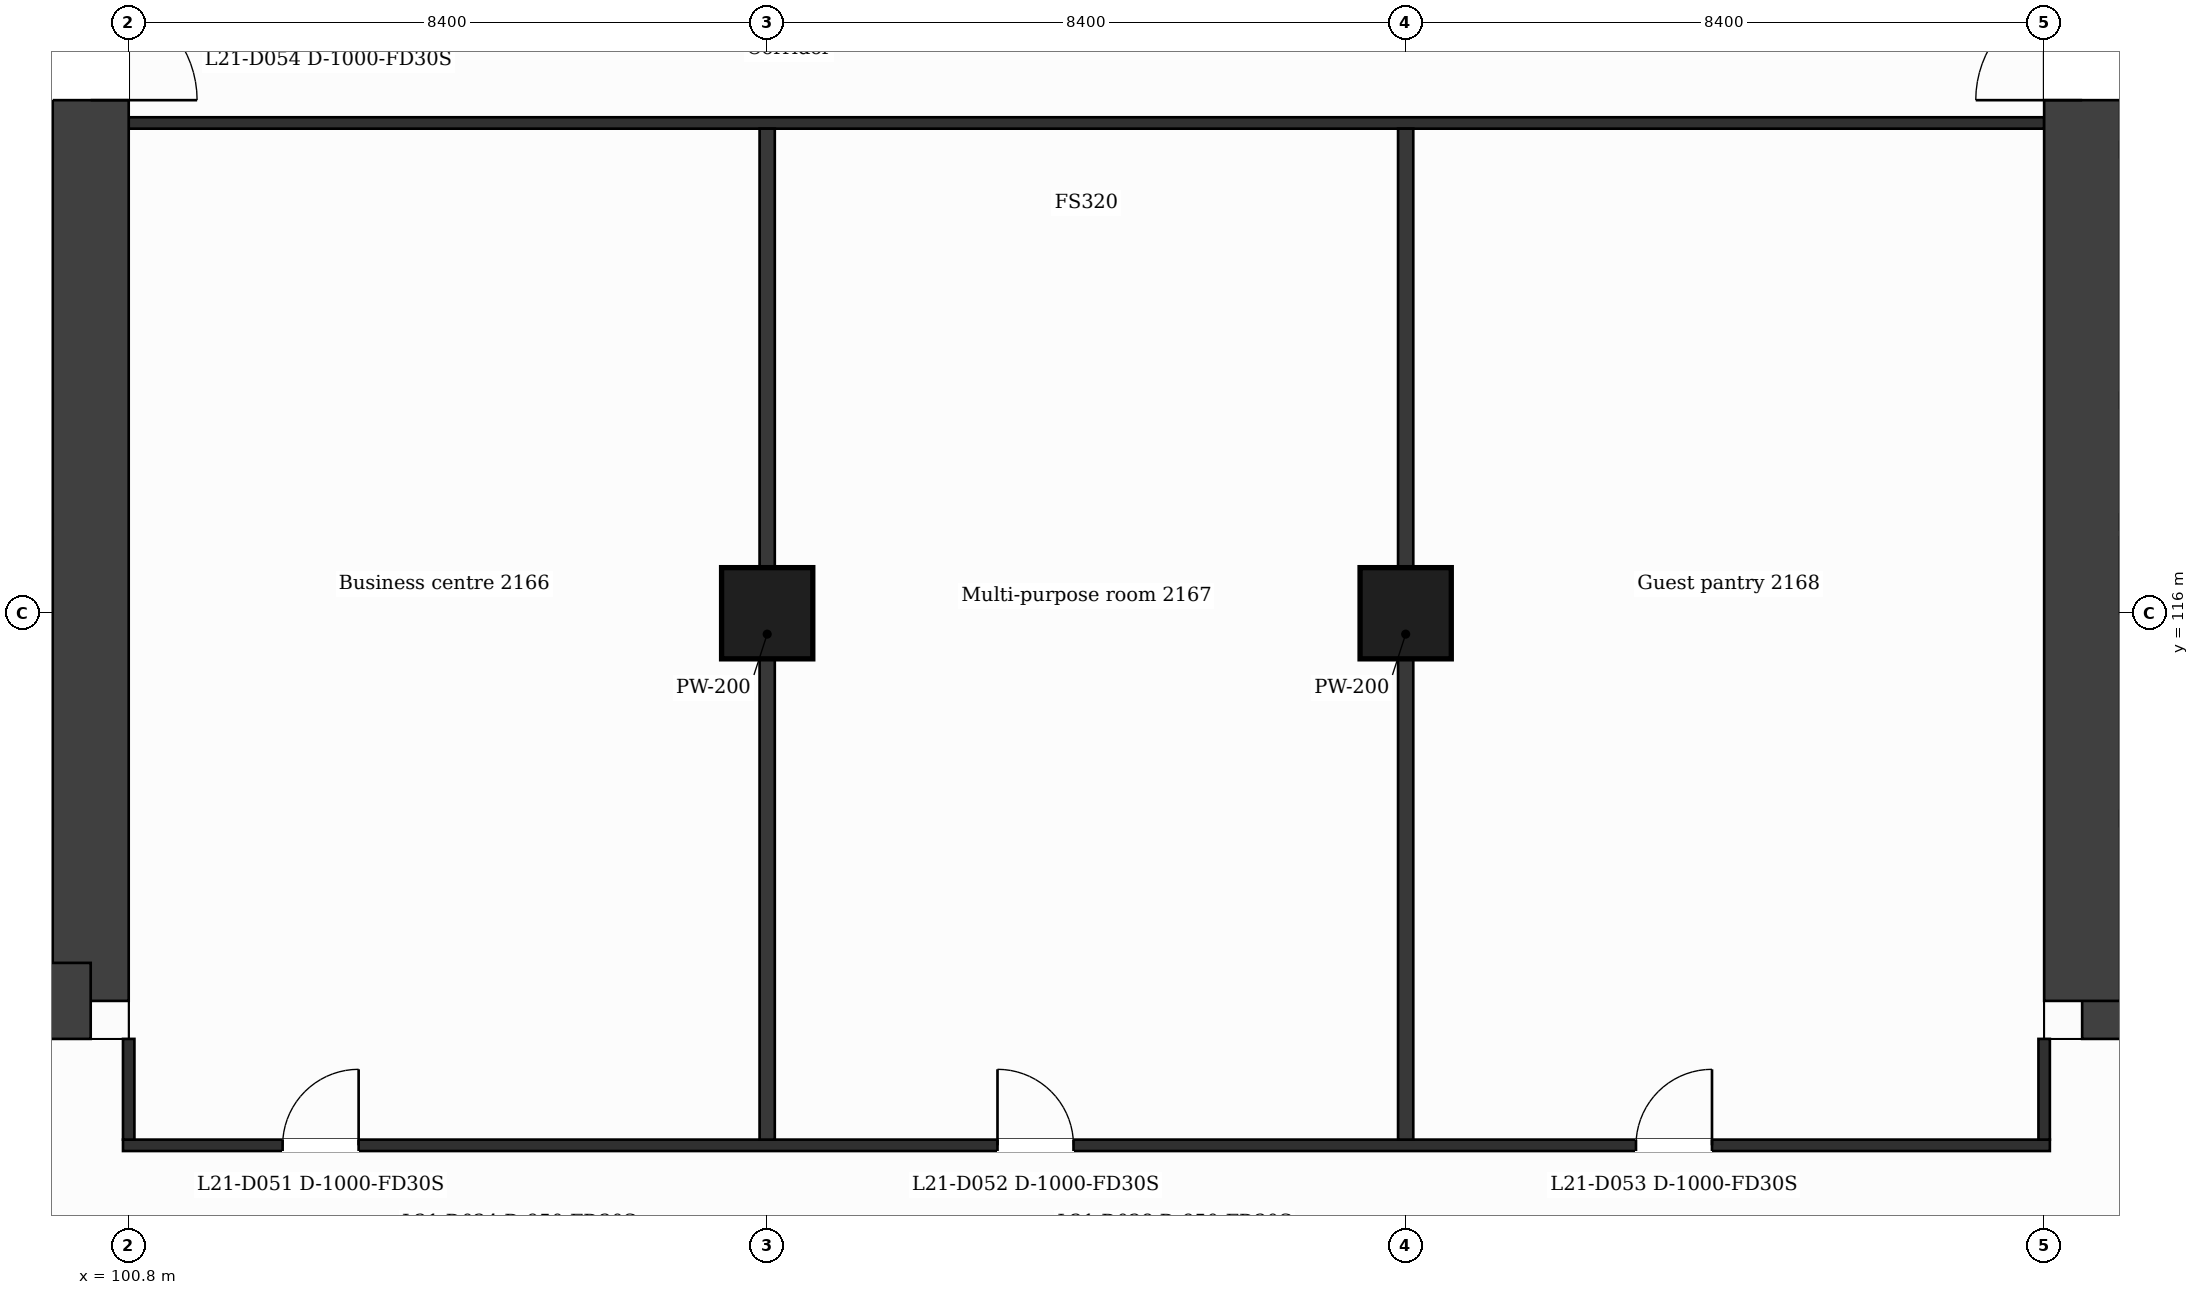
"""IFC4 building model, lengths in metres.
Left out: names, types, materials, properties, quantities, classifications, styles, units other than length and angle.
Written with IfcOpenShell. Run it as: python <this file> out.ifc"""

import sys

from ifc_helpers import new_model, si_unit, direction, frame, frame_2d, origin, origin_2d, place, context, subcontext, project, spatial, rectangle, extrude, element, fill, save


model = new_model("IFC4")
c1 = context("Model", 3, precision=1e-05, world=origin(), true_north=direction((0.0, 1.0)))
c2 = subcontext(c1, "Body", "Model", "MODEL_VIEW")
j1 = project(units=[si_unit("LENGTHUNIT", "METRE"), si_unit("PLANEANGLEUNIT", "RADIAN")], contexts=[c1])
p1 = place(None, origin())
s1 = spatial("IfcSite", under=j1, at=p1, CompositionType="ELEMENT")
p2 = place(p1, origin())
s2 = spatial("IfcBuilding", under=s1, at=p2, CompositionType="ELEMENT")
p3 = place(p2, frame((0.0, 0.0, 94.7)))
s3 = spatial("IfcBuildingStorey", under=s2, at=p3, CompositionType="ELEMENT", Elevation=94.7)
p4 = place(p3, frame((100.3, 131.9, 0.0), z_axis=(0.0, 0.0, 1.0), x_axis=(0.0, -1.0, 0.0)))
e1 = element("IfcWall", 1, at=p4, inside=s3, PredefinedType="SHEAR", context=c2, shape_type="SweptSolid", body=[
    extrude(rectangle(XDim=21.0, YDim=1.0, at=frame_2d((10.5, 0.0))), origin(), (0.0, 0.0, 1.0), 3.7),
])
p5 = place(p4, frame((7.75, 0.0, 0.0)))
e2 = element("IfcOpeningElement", 2, at=p5, cuts=e1, PredefinedType="OPENING", context=c2, shape_type="SweptSolid", body=[
    extrude(rectangle(XDim=1.4, YDim=2.1, at=frame_2d((0.7, 1.05))), frame((0.0, 0.51, 0.0), z_axis=(0.0, -1.0, 0.0), x_axis=(1.0, 0.0, 0.0)), (0.0, 0.0, 1.0), 1.02),
])
p6 = place(p3, frame((100.3, 110.9, 0.0), z_axis=(0.0, 0.0, 1.0), x_axis=(-1.0, 0.0, 0.0)))
e3 = element("IfcWall", 3, at=p6, inside=s3, PredefinedType="SHEAR", context=c2, shape_type="SweptSolid", body=[
    extrude(rectangle(XDim=14.059, YDim=1.0, at=frame_2d((7.03, 0.0))), origin(), (0.0, 0.0, 1.0), 3.7),
])
p7 = place(p6, frame((5.802, 0.0, 0.0)))
e4 = element("IfcOpeningElement", 4, at=p7, cuts=e3, PredefinedType="OPENING", context=c2, shape_type="SweptSolid", body=[
    extrude(rectangle(XDim=1.4, YDim=2.1, at=frame_2d((0.7, 1.05))), frame((0.0, 0.51, 0.0), z_axis=(0.0, -1.0, 0.0), x_axis=(1.0, 0.0, 0.0)), (0.0, 0.0, 1.0), 1.02),
])
p8 = place(p3, frame((94.9, 116.5, 0.0), z_axis=(0.0, 0.0, 1.0), x_axis=(1.0, 0.0, 0.0)))
e5 = element("IfcWall", 5, at=p8, inside=s3, PredefinedType="SHEAR", context=c2, shape_type="SweptSolid", body=[
    extrude(rectangle(XDim=4.9, YDim=1.0, at=frame_2d((2.45, 0.0))), origin(), (0.0, 0.0, 1.0), 3.7),
])
p9 = place(p3, frame((140.559, 110.9, 0.0), z_axis=(0.0, 0.0, 1.0), x_axis=(-1.0, 0.0, 0.0)))
e6 = element("IfcWall", 6, at=p9, inside=s3, PredefinedType="SHEAR", context=c2, shape_type="SweptSolid", body=[
    extrude(rectangle(XDim=14.059, YDim=1.0, at=frame_2d((7.029, 0.0))), origin(), (0.0, 0.0, 1.0), 3.7),
])
p10 = place(p9, frame((6.858, 0.0, 0.0)))
e7 = element("IfcOpeningElement", 7, at=p10, cuts=e6, PredefinedType="OPENING", context=c2, shape_type="SweptSolid", body=[
    extrude(rectangle(XDim=1.4, YDim=2.1, at=frame_2d((0.7, 1.05))), frame((0.0, 0.51, 0.0), z_axis=(0.0, -1.0, 0.0), x_axis=(1.0, 0.0, 0.0)), (0.0, 0.0, 1.0), 1.02),
])
p11 = place(p3, frame((126.5, 110.9, 0.0), z_axis=(0.0, 0.0, 1.0), x_axis=(0.0, 1.0, 0.0)))
e8 = element("IfcWall", 8, at=p11, inside=s3, PredefinedType="SHEAR", context=c2, shape_type="SweptSolid", body=[
    extrude(rectangle(XDim=21.0, YDim=1.0, at=frame_2d((10.5, 0.0))), origin(), (0.0, 0.0, 1.0), 3.7),
])
p12 = place(p11, frame((11.85, 0.0, 0.0)))
e9 = element("IfcOpeningElement", 9, at=p12, cuts=e8, PredefinedType="OPENING", context=c2, shape_type="SweptSolid", body=[
    extrude(rectangle(XDim=1.4, YDim=2.1, at=frame_2d((0.7, 1.05))), frame((0.0, 0.51, 0.0), z_axis=(0.0, -1.0, 0.0), x_axis=(1.0, 0.0, 0.0)), (0.0, 0.0, 1.0), 1.02),
])
for number, where, z_axis, x_axis in (
    (10, (109.2, 116.0, 0.0), (0.0, 0.0, 1.0), (1.0, 0.0, 0.0)),
    (11, (117.6, 116.0, 0.0), (0.0, 0.0, 1.0), (1.0, 0.0, 0.0)),
):
    element("IfcColumn", number, at=place(p3, frame(where, z_axis=z_axis, x_axis=x_axis)), inside=s3, PredefinedType="COLUMN", context=c2, shape_type="SweptSolid", body=[
        extrude(rectangle(XDim=1.2, YDim=1.2, at=origin_2d()), origin(), (0.0, 0.0, 1.0), 3.7),
    ])
p13 = place(p3, frame((100.725, 109.0, 0.0), z_axis=(0.0, 0.0, 1.0), x_axis=(1.0, 0.0, 0.0)))
e12 = element("IfcWall", 12, at=p13, inside=s3, PredefinedType="PARTITIONING", context=c2, shape_type="SweptSolid", body=[
    extrude(rectangle(XDim=25.35, YDim=0.15, at=frame_2d((12.675, 0.0))), origin(), (0.0, 0.0, 1.0), 3.38),
])
p14 = place(p13, frame((2.1, 0.0, 0.0)))
e13 = element("IfcOpeningElement", 13, at=p14, cuts=e12, PredefinedType="OPENING", context=c2, shape_type="SweptSolid", body=[
    extrude(rectangle(XDim=1.0, YDim=2.1, at=frame_2d((0.5, 1.05))), frame((0.0, 0.085, 0.0), z_axis=(0.0, -1.0, 0.0), x_axis=(1.0, 0.0, 0.0)), (0.0, 0.0, 1.0), 0.17),
])
p15 = place(p13, frame((11.505, 0.0, 0.0)))
e14 = element("IfcOpeningElement", 14, at=p15, cuts=e12, PredefinedType="OPENING", context=c2, shape_type="SweptSolid", body=[
    extrude(rectangle(XDim=1.0, YDim=2.1, at=frame_2d((0.5, 1.05))), frame((0.0, 0.085, 0.0), z_axis=(0.0, -1.0, 0.0), x_axis=(1.0, 0.0, 0.0)), (0.0, 0.0, 1.0), 0.17),
])
p16 = place(p13, frame((19.905, 0.0, 0.0)))
e15 = element("IfcOpeningElement", 15, at=p16, cuts=e12, PredefinedType="OPENING", context=c2, shape_type="SweptSolid", body=[
    extrude(rectangle(XDim=1.0, YDim=2.1, at=frame_2d((0.5, 1.05))), frame((0.0, 0.085, 0.0), z_axis=(0.0, -1.0, 0.0), x_axis=(1.0, 0.0, 0.0)), (0.0, 0.0, 1.0), 0.17),
])
p17 = place(p3, frame((127.0, 113.3, 0.0), z_axis=(0.0, 0.0, 1.0), x_axis=(1.0, 0.0, 0.0)))
e16 = element("IfcWall", 16, at=p17, inside=s3, PredefinedType="PARTITIONING", context=c2, shape_type="SweptSolid", body=[
    extrude(rectangle(XDim=4.673, YDim=0.2, at=frame_2d((2.336, 0.0))), origin(), (0.0, 0.0, 1.0), 3.38),
])
p18 = place(p17, frame((0.593, 0.0, 0.0)))
e17 = element("IfcOpeningElement", 17, at=p18, cuts=e16, PredefinedType="OPENING", context=c2, shape_type="SweptSolid", body=[
    extrude(rectangle(XDim=1.1, YDim=2.1, at=frame_2d((0.55, 1.05))), frame((0.0, 0.11, 0.0), z_axis=(0.0, -1.0, 0.0), x_axis=(1.0, 0.0, 0.0)), (0.0, 0.0, 1.0), 0.22),
])
for number, where, z_axis, x_axis in (
    (18, (95.227, 117.2, 0.0), (0.0, 0.0, 1.0), (1.0, 0.0, 0.0)),
    (19, (95.227, 118.8, 0.0), (0.0, 0.0, 1.0), (1.0, 0.0, 0.0)),
):
    element("IfcWall", number, at=place(p3, frame(where, z_axis=z_axis, x_axis=x_axis)), inside=s3, PredefinedType="PARTITIONING", context=c2, shape_type="SweptSolid", body=[
        extrude(rectangle(XDim=4.573, YDim=0.2, at=frame_2d((2.287, 0.0))), origin(), (0.0, 0.0, 1.0), 3.38),
    ])
p19 = place(p3, frame((95.227, 122.1, 0.0), z_axis=(0.0, 0.0, 1.0), x_axis=(1.0, 0.0, 0.0)))
e20 = element("IfcWall", 20, at=p19, inside=s3, PredefinedType="PARTITIONING", context=c2, shape_type="SweptSolid", body=[
    extrude(rectangle(XDim=4.573, YDim=0.2, at=frame_2d((2.287, 0.0))), origin(), (0.0, 0.0, 1.0), 3.38),
])
p20 = place(p19, frame((0.522, 0.0, 0.0)))
e21 = element("IfcOpeningElement", 21, at=p20, cuts=e20, PredefinedType="OPENING", context=c2, shape_type="SweptSolid", body=[
    extrude(rectangle(XDim=0.9, YDim=2.1, at=frame_2d((0.45, 1.05))), frame((0.0, 0.11, 0.0), z_axis=(0.0, -1.0, 0.0), x_axis=(1.0, 0.0, 0.0)), (0.0, 0.0, 1.0), 0.22),
])
p21 = place(p19, frame((2.98, 0.0, 0.0)))
e22 = element("IfcOpeningElement", 22, at=p21, cuts=e20, PredefinedType="OPENING", context=c2, shape_type="SweptSolid", body=[
    extrude(rectangle(XDim=0.9, YDim=2.1, at=frame_2d((0.45, 1.05))), frame((0.0, 0.11, 0.0), z_axis=(0.0, -1.0, 0.0), x_axis=(1.0, 0.0, 0.0)), (0.0, 0.0, 1.0), 0.22),
])
p22 = place(p3, frame((100.8, 122.45, 0.0), z_axis=(0.0, 0.0, 1.0), x_axis=(1.0, 0.0, 0.0)))
e23 = element("IfcWall", 23, at=p22, inside=s3, PredefinedType="PARTITIONING", context=c2, shape_type="SweptSolid", body=[
    extrude(rectangle(XDim=25.2, YDim=0.15, at=frame_2d((12.6, 0.0))), origin(), (0.0, 0.0, 1.0), 3.38),
])
p23 = place(p3, frame((100.8, 109.075, 0.0), z_axis=(0.0, 0.0, 1.0), x_axis=(0.0, 1.0, 0.0)))
e24 = element("IfcWall", 24, at=p23, inside=s3, PredefinedType="PARTITIONING", context=c2, shape_type="SweptSolid", body=[
    extrude(rectangle(XDim=1.325, YDim=0.15, at=frame_2d((0.663, 0.0))), origin(), (0.0, 0.0, 1.0), 3.38),
])
for number, where, z_axis, x_axis in (
    (25, (109.2, 109.075, 0.0), (0.0, 0.0, 1.0), (0.0, 1.0, 0.0)),
    (26, (117.6, 109.075, 0.0), (0.0, 0.0, 1.0), (0.0, 1.0, 0.0)),
):
    element("IfcWall", number, at=place(p3, frame(where, z_axis=z_axis, x_axis=x_axis)), inside=s3, PredefinedType="PARTITIONING", context=c2, shape_type="SweptSolid", body=[
        extrude(rectangle(XDim=13.3, YDim=0.2, at=frame_2d((6.65, 0.0))), origin(), (0.0, 0.0, 1.0), 3.38),
    ])
p24 = place(p3, frame((126.0, 109.075, 0.0), z_axis=(0.0, 0.0, 1.0), x_axis=(0.0, 1.0, 0.0)))
e27 = element("IfcWall", 27, at=p24, inside=s3, PredefinedType="PARTITIONING", context=c2, shape_type="SweptSolid", body=[
    extrude(rectangle(XDim=1.325, YDim=0.15, at=frame_2d((0.663, 0.0))), origin(), (0.0, 0.0, 1.0), 3.38),
])
p25 = place(p14, origin())
e28 = element("IfcDoor", 28, at=p25, inside=s3, OperationType="SINGLE_SWING_RIGHT", PredefinedType="DOOR", context=c2, shape_type="SweptSolid", body=[
    extrude(rectangle(XDim=1.0, YDim=2.1, at=frame_2d((0.5, 1.05))), frame((0.0, 0.025, 0.0), z_axis=(0.0, -1.0, 0.0), x_axis=(1.0, 0.0, 0.0)), (0.0, 0.0, 1.0), 0.05),
])
fill(e13, e28)
p26 = place(p15, origin())
e29 = element("IfcDoor", 29, at=p26, inside=s3, OperationType="SINGLE_SWING_LEFT", PredefinedType="DOOR", context=c2, shape_type="SweptSolid", body=[
    extrude(rectangle(XDim=1.0, YDim=2.1, at=frame_2d((0.5, 1.05))), frame((0.0, 0.025, 0.0), z_axis=(0.0, -1.0, 0.0), x_axis=(1.0, 0.0, 0.0)), (0.0, 0.0, 1.0), 0.05),
])
fill(e14, e29)
p27 = place(p16, origin())
e30 = element("IfcDoor", 30, at=p27, inside=s3, OperationType="SINGLE_SWING_RIGHT", PredefinedType="DOOR", context=c2, shape_type="SweptSolid", body=[
    extrude(rectangle(XDim=1.0, YDim=2.1, at=frame_2d((0.5, 1.05))), frame((0.0, 0.025, 0.0), z_axis=(0.0, -1.0, 0.0), x_axis=(1.0, 0.0, 0.0)), (0.0, 0.0, 1.0), 0.05),
])
fill(e15, e30)
p28 = place(p5, origin())
e31 = element("IfcDoor", 31, at=p28, inside=s3, OperationType="SINGLE_SWING_RIGHT", PredefinedType="DOOR", context=c2, shape_type="SweptSolid", body=[
    extrude(rectangle(XDim=1.4, YDim=2.1, at=frame_2d((0.7, 1.05))), frame((0.0, 0.025, 0.0), z_axis=(0.0, -1.0, 0.0), x_axis=(1.0, 0.0, 0.0)), (0.0, 0.0, 1.0), 0.05),
])
fill(e2, e31)
p29 = place(p12, origin())
e32 = element("IfcDoor", 32, at=p29, inside=s3, OperationType="SINGLE_SWING_LEFT", PredefinedType="DOOR", context=c2, shape_type="SweptSolid", body=[
    extrude(rectangle(XDim=1.4, YDim=2.1, at=frame_2d((0.7, 1.05))), frame((0.0, 0.025, 0.0), z_axis=(0.0, -1.0, 0.0), x_axis=(1.0, 0.0, 0.0)), (0.0, 0.0, 1.0), 0.05),
])
fill(e9, e32)
save(model, sys.argv[1])
